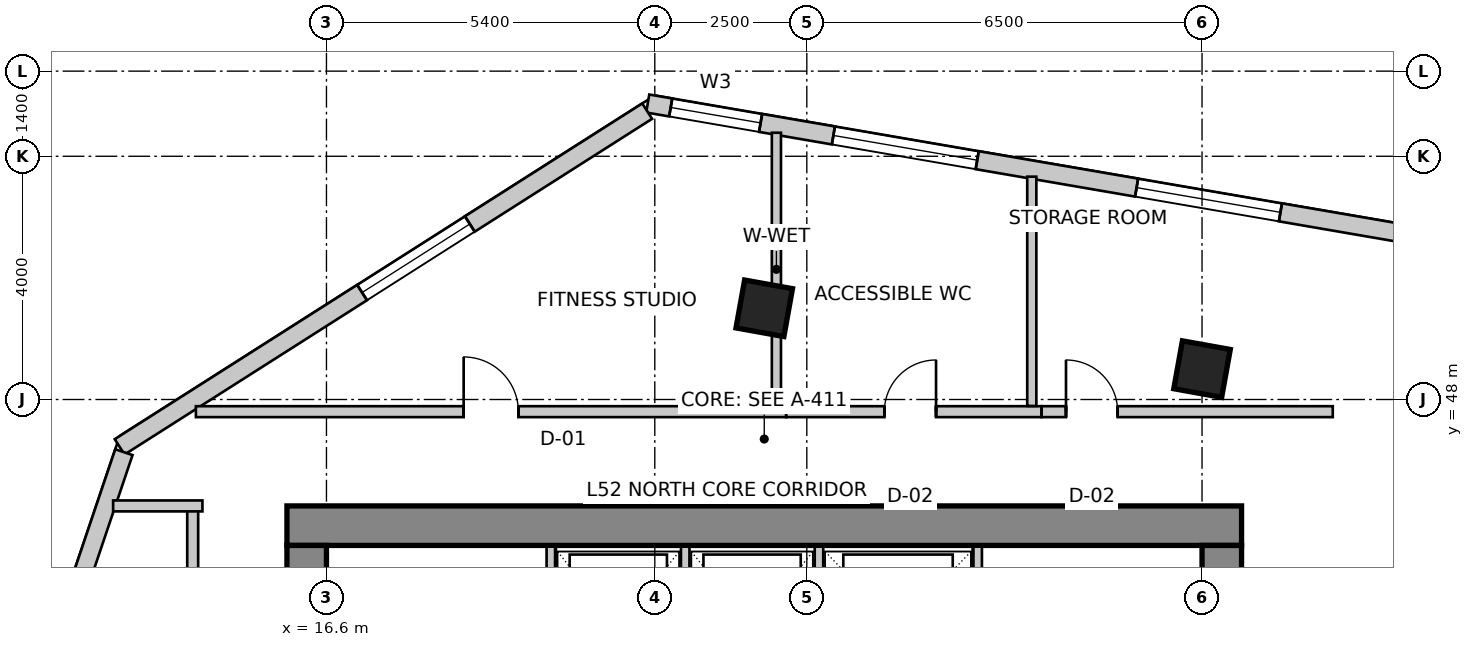
"""IFC4 building model, lengths in metres.
Left out: names, types, materials, properties, quantities, classifications, styles, units other than length and angle.
Written with IfcOpenShell. Run it as: python <this file> out.ifc"""

import sys

from ifc_helpers import new_model, si_unit, direction, frame, frame_2d, origin, origin_2d, place, context, subcontext, project, spatial, rectangle, extrude, source, transform, mapped, element, fill, save


model = new_model("IFC4")
c1 = context("Model", 3, precision=1e-05, world=origin(), true_north=direction((0.0, 1.0)))
c2 = subcontext(c1, "Body", "Model", "MODEL_VIEW")
j1 = project(units=[si_unit("LENGTHUNIT", "METRE"), si_unit("PLANEANGLEUNIT", "RADIAN")], contexts=[c1])
p1 = place(None, origin())
s1 = spatial("IfcSite", under=j1, at=p1, CompositionType="ELEMENT")
p2 = place(p1, origin())
s2 = spatial("IfcBuilding", under=s1, at=p2, CompositionType="ELEMENT")
p3 = place(p2, frame((0.0, 0.0, 207.9)))
s3 = spatial("IfcBuildingStorey", under=s2, at=p3, CompositionType="ELEMENT", Elevation=207.9)
p4 = place(p3, frame((15.95, 45.925, 0.0), z_axis=(0.0, 0.0, 1.0), x_axis=(1.0, 0.0, 0.0)))
e1 = element("IfcWall", 1, at=p4, inside=s3, PredefinedType="SHEAR", context=c2, shape_type="SweptSolid", body=[
    extrude(rectangle(XDim=15.7, YDim=0.65, at=frame_2d((7.85, 0.0))), origin(), (0.0, 0.0, 1.0), 3.5),
])
p5 = place(p3, frame((16.275, 34.2, 0.0), z_axis=(0.0, 0.0, 1.0), x_axis=(0.0, 1.0, 0.0)))
e2 = element("IfcWall", 2, at=p5, inside=s3, PredefinedType="SHEAR", context=c2, shape_type="SweptSolid", body=[
    extrude(rectangle(XDim=11.4, YDim=0.65, at=frame_2d((5.7, 0.0))), origin(), (0.0, 0.0, 1.0), 3.5),
])
m1 = source(origin(), c2, "Body", "SweptSolid", [
    extrude(rectangle(XDim=1.1, YDim=2.15, at=frame_2d((0.55, 1.075))), frame((0.0, 0.335, 0.0), z_axis=(0.0, -1.0, 0.0), x_axis=(1.0, 0.0, 0.0)), (0.0, 0.0, 1.0), 0.67),
])
p6 = place(p5, frame((7.15, 0.0, 0.0)))
e3 = element("IfcOpeningElement", 3, at=p6, cuts=e2, PredefinedType="OPENING", context=c2, shape_type="MappedRepresentation", body=[
    mapped(m1, transform((0.0, 0.0, 0.0), scale=1.0)),
])
p7 = place(p3, frame((31.325, 34.2, 0.0), z_axis=(0.0, 0.0, 1.0), x_axis=(0.0, 1.0, 0.0)))
e4 = element("IfcWall", 4, at=p7, inside=s3, PredefinedType="SHEAR", context=c2, shape_type="SweptSolid", body=[
    extrude(rectangle(XDim=11.4, YDim=0.65, at=frame_2d((5.7, 0.0))), origin(), (0.0, 0.0, 1.0), 3.5),
])
p8 = place(p7, frame((7.35, 0.0, 0.0)))
e5 = element("IfcOpeningElement", 5, at=p8, cuts=e4, PredefinedType="OPENING", context=c2, shape_type="MappedRepresentation", body=[
    mapped(m1, transform((0.0, 0.0, 0.0), scale=1.0)),
])
m2 = source(origin(), c2, "Body", "SweptSolid", [
    extrude(rectangle(XDim=0.8, YDim=0.8, at=origin_2d()), origin(), (0.0, 0.0, 1.0), 3.5),
])
for number, where, z_axis, x_axis in (
    (6, (23.8, 49.5, 0.0), (0.0, 0.0, 1.0), (0.984, -0.177, 0.0)),
    (7, (31.0, 48.5, 0.0), (0.0, 0.0, 1.0), (0.984, -0.177, 0.0)),
):
    element("IfcColumn", number, at=place(p3, frame(where, z_axis=z_axis, x_axis=x_axis)), inside=s3, PredefinedType="COLUMN", context=c2, shape_type="MappedRepresentation", body=[
        mapped(m2, transform((0.0, 0.0, 0.0), scale=1.0)),
    ])
p9 = place(p3, frame((48.361, 48.313, 0.0), z_axis=(0.0, 0.0, 1.0), x_axis=(-0.985523113069, 0.169541126597, 0.0)))
e8 = element("IfcWall", 8, at=p9, inside=s3, PredefinedType="SOLIDWALL", context=c2, shape_type="SweptSolid", body=[
    extrude(rectangle(XDim=26.866, YDim=0.3, at=frame_2d((13.433, 0.0))), origin(), (0.0, 0.0, 1.0), 3.2),
])
m3 = source(origin(), c2, "Body", "SweptSolid", [
    extrude(rectangle(XDim=2.4, YDim=2.2, at=frame_2d((1.2, 1.1))), frame((0.0, 0.16, 0.0), z_axis=(0.0, -1.0, 0.0), x_axis=(1.0, 0.0, 0.0)), (0.0, 0.0, 1.0), 0.32),
])
p10 = place(p9, frame((0.721, 0.0, 0.85)))
e9 = element("IfcOpeningElement", 9, at=p10, cuts=e8, PredefinedType="OPENING", context=c2, shape_type="MappedRepresentation", body=[
    mapped(m3, transform((0.0, 0.0, 0.0), scale=1.0)),
])
p11 = place(p9, frame((5.471, 0.0, 0.85)))
e10 = element("IfcOpeningElement", 10, at=p11, cuts=e8, PredefinedType="OPENING", context=c2, shape_type="MappedRepresentation", body=[
    mapped(m3, transform((0.0, 0.0, 0.0), scale=1.0)),
])
m4 = source(origin(), c2, "Body", "SweptSolid", [
    extrude(rectangle(XDim=2.1, YDim=2.0, at=frame_2d((1.05, 1.0))), frame((0.0, 0.16, 0.0), z_axis=(0.0, -1.0, 0.0), x_axis=(1.0, 0.0, 0.0)), (0.0, 0.0, 1.0), 0.32),
])
p12 = place(p9, frame((11.04, 0.0, 0.85)))
e11 = element("IfcOpeningElement", 11, at=p12, cuts=e8, PredefinedType="OPENING", context=c2, shape_type="MappedRepresentation", body=[
    mapped(m4, transform((0.0, 0.0, 0.0), scale=1.0)),
])
p13 = place(p9, frame((16.308, 0.0, 0.85)))
e12 = element("IfcOpeningElement", 12, at=p13, cuts=e8, PredefinedType="OPENING", context=c2, shape_type="MappedRepresentation", body=[
    mapped(m3, transform((0.0, 0.0, 0.0), scale=1.0)),
])
p14 = place(p9, frame((21.368, 0.0, 0.85)))
e13 = element("IfcOpeningElement", 13, at=p14, cuts=e8, PredefinedType="OPENING", context=c2, shape_type="MappedRepresentation", body=[
    mapped(m3, transform((0.0, 0.0, 0.0), scale=1.0)),
])
m5 = source(origin(), c2, "Body", "SweptSolid", [
    extrude(rectangle(XDim=1.5, YDim=1.8, at=frame_2d((0.75, 0.9))), frame((0.0, 0.16, 0.0), z_axis=(0.0, -1.0, 0.0), x_axis=(1.0, 0.0, 0.0)), (0.0, 0.0, 1.0), 0.32),
])
p15 = place(p9, frame((24.983, 0.0, 0.85)))
e14 = element("IfcOpeningElement", 14, at=p15, cuts=e8, PredefinedType="OPENING", context=c2, shape_type="MappedRepresentation", body=[
    mapped(m5, transform((0.0, 0.0, 0.0), scale=1.0)),
])
p16 = place(p3, frame((21.875, 52.742, 0.0), z_axis=(0.0, 0.0, 1.0), x_axis=(-0.843666375448, -0.536867811419, 0.0)))
e15 = element("IfcWall", 15, at=p16, inside=s3, PredefinedType="SOLIDWALL", context=c2, shape_type="SweptSolid", body=[
    extrude(rectangle(XDim=10.284, YDim=0.3, at=frame_2d((5.142, 0.0))), origin(), (0.0, 0.0, 1.0), 3.2),
])
p17 = place(p16, frame((3.457, 0.0, 0.85)))
e16 = element("IfcOpeningElement", 16, at=p17, cuts=e15, PredefinedType="OPENING", context=c2, shape_type="MappedRepresentation", body=[
    mapped(m4, transform((0.0, 0.0, 0.0), scale=1.0)),
])
p18 = place(p3, frame((13.269, 47.134, 0.0), z_axis=(0.0, 0.0, 1.0), x_axis=(-0.319920776449, -0.947444297464, 0.0)))
e17 = element("IfcWall", 17, at=p18, inside=s3, PredefinedType="SOLIDWALL", context=c2, shape_type="SweptSolid", body=[
    extrude(rectangle(XDim=16.133, YDim=0.3, at=frame_2d((8.067, 0.0))), origin(), (0.0, 0.0, 1.0), 3.2),
])
p19 = place(p18, frame((2.363, 0.0, 0.85)))
e18 = element("IfcOpeningElement", 18, at=p19, cuts=e17, PredefinedType="OPENING", context=c2, shape_type="MappedRepresentation", body=[
    mapped(m3, transform((0.0, 0.0, 0.0), scale=1.0)),
])
p20 = place(p18, frame((7.41, 0.0, 0.85)))
e19 = element("IfcOpeningElement", 19, at=p20, cuts=e17, PredefinedType="OPENING", context=c2, shape_type="MappedRepresentation", body=[
    mapped(m4, transform((0.0, 0.0, 0.0), scale=1.0)),
])
p21 = place(p18, frame((12.157, 0.0, 0.85)))
e20 = element("IfcOpeningElement", 20, at=p21, cuts=e17, PredefinedType="OPENING", context=c2, shape_type="MappedRepresentation", body=[
    mapped(m3, transform((0.0, 0.0, 0.0), scale=1.0)),
])
for number, where, z_axis, x_axis in (
    (21, (20.29, 43.28, 0.0), (0.0, 0.0, 1.0), (0.0, 1.0, 0.0)),
    (22, (27.31, 43.28, 0.0), (0.0, 0.0, 1.0), (0.0, 1.0, 0.0)),
):
    element("IfcWall", number, at=place(p3, frame(where, z_axis=z_axis, x_axis=x_axis)), inside=s3, PredefinedType="SOLIDWALL", context=c2, shape_type="SweptSolid", body=[
        extrude(rectangle(XDim=2.3, YDim=0.14, at=frame_2d((1.15, 0.0))), origin(), (0.0, 0.0, 1.0), 3.2),
    ])
for number, where, z_axis, x_axis in (
    (23, (22.5, 43.02, 0.0), (0.0, 0.0, 1.0), (0.0, 1.0, 0.0)),
    (24, (24.7, 43.02, 0.0), (0.0, 0.0, 1.0), (0.0, 1.0, 0.0)),
):
    element("IfcWall", number, at=place(p3, frame(where, z_axis=z_axis, x_axis=x_axis)), inside=s3, PredefinedType="SOLIDWALL", context=c2, shape_type="SweptSolid", body=[
        extrude(rectangle(XDim=2.56, YDim=0.14, at=frame_2d((1.28, 0.0))), origin(), (0.0, 0.0, 1.0), 3.2),
    ])
p22 = place(p3, frame((14.4, 33.644, 0.0), z_axis=(0.0, 0.0, 1.0), x_axis=(0.0, 1.0, 0.0)))
e25 = element("IfcWall", 25, at=p22, inside=s3, PredefinedType="PARTITIONING", context=c2, shape_type="SweptSolid", body=[
    extrude(rectangle(XDim=12.606, YDim=0.18, at=frame_2d((6.303, 0.0))), origin(), (0.0, 0.0, 1.0), 3.2),
])
m6 = source(origin(), c2, "Body", "SweptSolid", [
    extrude(rectangle(XDim=0.9, YDim=2.15, at=frame_2d((0.45, 1.075))), frame((0.0, 0.1, 0.0), z_axis=(0.0, -1.0, 0.0), x_axis=(1.0, 0.0, 0.0)), (0.0, 0.0, 1.0), 0.2),
])
p23 = place(p22, frame((4.399, 0.0, 0.0)))
e26 = element("IfcOpeningElement", 26, at=p23, cuts=e25, PredefinedType="OPENING", context=c2, shape_type="MappedRepresentation", body=[
    mapped(m6, transform((0.0, 0.0, 0.0), scale=1.0)),
])
p24 = place(p3, frame((14.56, 46.25, 0.0), z_axis=(0.0, 0.0, 1.0), x_axis=(-1.0, 0.0, 0.0)))
e27 = element("IfcWall", 27, at=p24, inside=s3, PredefinedType="PARTITIONING", context=c2, shape_type="SweptSolid", body=[
    extrude(rectangle(XDim=1.469, YDim=0.18, at=frame_2d((0.734, 0.0))), origin(), (0.0, 0.0, 1.0), 3.2),
])
p25 = place(p3, frame((14.453, 47.8, 0.0), z_axis=(0.0, 0.0, 1.0), x_axis=(1.0, 0.0, 0.0)))
e28 = element("IfcWall", 28, at=p25, inside=s3, PredefinedType="PARTITIONING", context=c2, shape_type="SweptSolid", body=[
    extrude(rectangle(XDim=9.707, YDim=0.18, at=frame_2d((4.854, 0.0))), origin(), (0.0, 0.0, 1.0), 2.869),
])
p26 = place(p25, frame((4.404, 0.0, 0.0)))
e29 = element("IfcOpeningElement", 29, at=p26, cuts=e28, PredefinedType="OPENING", context=c2, shape_type="MappedRepresentation", body=[
    mapped(m6, transform((0.0, 0.0, 0.0), scale=1.0)),
])
p27 = place(p3, frame((24.162, 47.8, 0.0), z_axis=(0.0, 0.0, 1.0), x_axis=(1.0, 0.0, 0.0)))
e30 = element("IfcWall", 30, at=p27, inside=s3, PredefinedType="PARTITIONING", context=c2, shape_type="SweptSolid", body=[
    extrude(rectangle(XDim=4.198, YDim=0.18, at=frame_2d((2.099, 0.0))), origin(), (0.0, 0.0, 1.0), 3.2),
])
m7 = source(origin(), c2, "Body", "SweptSolid", [
    extrude(rectangle(XDim=0.85, YDim=2.15, at=frame_2d((0.425, 1.075))), frame((0.0, 0.1, 0.0), z_axis=(0.0, -1.0, 0.0), x_axis=(1.0, 0.0, 0.0)), (0.0, 0.0, 1.0), 0.2),
])
p28 = place(p27, frame((1.613, 0.0, 0.0)))
e31 = element("IfcOpeningElement", 31, at=p28, cuts=e30, PredefinedType="OPENING", context=c2, shape_type="MappedRepresentation", body=[
    mapped(m7, transform((0.0, 0.0, 0.0), scale=1.0)),
])
p29 = place(p3, frame((28.362, 47.8, 0.0), z_axis=(0.0, 0.0, 1.0), x_axis=(1.0, 0.0, 0.0)))
e32 = element("IfcWall", 32, at=p29, inside=s3, PredefinedType="PARTITIONING", context=c2, shape_type="SweptSolid", body=[
    extrude(rectangle(XDim=4.788, YDim=0.18, at=frame_2d((2.394, 0.0))), origin(), (0.0, 0.0, 1.0), 2.729),
])
p30 = place(p29, frame((0.401, 0.0, 0.0)))
e33 = element("IfcOpeningElement", 33, at=p30, cuts=e32, PredefinedType="OPENING", context=c2, shape_type="MappedRepresentation", body=[
    mapped(m7, transform((0.0, 0.0, 0.0), scale=1.0)),
])
p31 = place(p3, frame((24.0, 52.387, 0.0), z_axis=(0.0, 0.0, 1.0), x_axis=(0.0, -1.0, 0.0)))
e34 = element("IfcWall", 34, at=p31, inside=s3, PredefinedType="PARTITIONING", context=c2, shape_type="SweptSolid", body=[
    extrude(rectangle(XDim=4.493, YDim=0.15, at=frame_2d((2.247, 0.0))), origin(), (0.0, 0.0, 1.0), 2.492),
])
p32 = place(p3, frame((28.2, 51.665, 0.0), z_axis=(0.0, 0.0, 1.0), x_axis=(0.0, -1.0, 0.0)))
e35 = element("IfcWall", 35, at=p32, inside=s3, PredefinedType="PARTITIONING", context=c2, shape_type="SweptSolid", body=[
    extrude(rectangle(XDim=3.771, YDim=0.15, at=frame_2d((1.885, 0.0))), origin(), (0.0, 0.0, 1.0), 2.492),
])
m8 = source(origin(), c2, "Body", "SweptSolid", [
    extrude(rectangle(XDim=2.4, YDim=2.2, at=frame_2d((1.2, 1.1))), frame((0.0, -0.015, 0.0), z_axis=(0.0, -1.0, 0.0), x_axis=(1.0, 0.0, 0.0)), (0.0, 0.0, 1.0), 0.06),
])
p33 = place(p13, origin())
e36 = element("IfcWindow", 36, at=p33, inside=s3, PartitioningType="SINGLE_PANEL", PredefinedType="WINDOW", context=c2, shape_type="MappedRepresentation", body=[
    mapped(m8, transform((0.0, 0.0, 0.0), scale=1.0)),
])
fill(e12, e36)
p34 = place(p14, origin())
e37 = element("IfcWindow", 37, at=p34, inside=s3, PartitioningType="SINGLE_PANEL", PredefinedType="WINDOW", context=c2, shape_type="MappedRepresentation", body=[
    mapped(m8, transform((0.0, 0.0, 0.0), scale=1.0)),
])
fill(e13, e37)
m9 = source(origin(), c2, "Body", "SweptSolid", [
    extrude(rectangle(XDim=1.5, YDim=1.8, at=frame_2d((0.75, 0.9))), frame((0.0, -0.015, 0.0), z_axis=(0.0, -1.0, 0.0), x_axis=(1.0, 0.0, 0.0)), (0.0, 0.0, 1.0), 0.06),
])
p35 = place(p15, origin())
e38 = element("IfcWindow", 38, at=p35, inside=s3, PartitioningType="SINGLE_PANEL", PredefinedType="WINDOW", context=c2, shape_type="MappedRepresentation", body=[
    mapped(m9, transform((0.0, 0.0, 0.0), scale=1.0)),
])
fill(e14, e38)
m10 = source(origin(), c2, "Body", "SweptSolid", [
    extrude(rectangle(XDim=2.1, YDim=2.0, at=frame_2d((1.05, 1.0))), frame((0.0, -0.015, 0.0), z_axis=(0.0, -1.0, 0.0), x_axis=(1.0, 0.0, 0.0)), (0.0, 0.0, 1.0), 0.06),
])
p36 = place(p17, origin())
e39 = element("IfcWindow", 39, at=p36, inside=s3, PartitioningType="SINGLE_PANEL", PredefinedType="WINDOW", context=c2, shape_type="MappedRepresentation", body=[
    mapped(m10, transform((0.0, 0.0, 0.0), scale=1.0)),
])
fill(e16, e39)
m11 = source(origin(), c2, "Body", "SweptSolid", [
    extrude(rectangle(XDim=0.9, YDim=2.15, at=frame_2d((0.45, 1.075))), frame((0.0, 0.025, 0.0), z_axis=(0.0, -1.0, 0.0), x_axis=(1.0, 0.0, 0.0)), (0.0, 0.0, 1.0), 0.05),
])
p37 = place(p26, origin())
e40 = element("IfcDoor", 40, at=p37, inside=s3, OperationType="SINGLE_SWING_LEFT", PredefinedType="DOOR", context=c2, shape_type="MappedRepresentation", body=[
    mapped(m11, transform((0.0, 0.0, 0.0), scale=1.0)),
])
fill(e29, e40)
m12 = source(origin(), c2, "Body", "SweptSolid", [
    extrude(rectangle(XDim=0.85, YDim=2.15, at=frame_2d((0.425, 1.075))), frame((0.0, 0.025, 0.0), z_axis=(0.0, -1.0, 0.0), x_axis=(1.0, 0.0, 0.0)), (0.0, 0.0, 1.0), 0.05),
])
p38 = place(p28, origin())
e41 = element("IfcDoor", 41, at=p38, inside=s3, OperationType="SINGLE_SWING_RIGHT", PredefinedType="DOOR", context=c2, shape_type="MappedRepresentation", body=[
    mapped(m12, transform((0.0, 0.0, 0.0), scale=1.0)),
])
fill(e31, e41)
p39 = place(p30, origin())
e42 = element("IfcDoor", 42, at=p39, inside=s3, OperationType="SINGLE_SWING_LEFT", PredefinedType="DOOR", context=c2, shape_type="MappedRepresentation", body=[
    mapped(m12, transform((0.0, 0.0, 0.0), scale=1.0)),
])
fill(e33, e42)
save(model, sys.argv[1])
